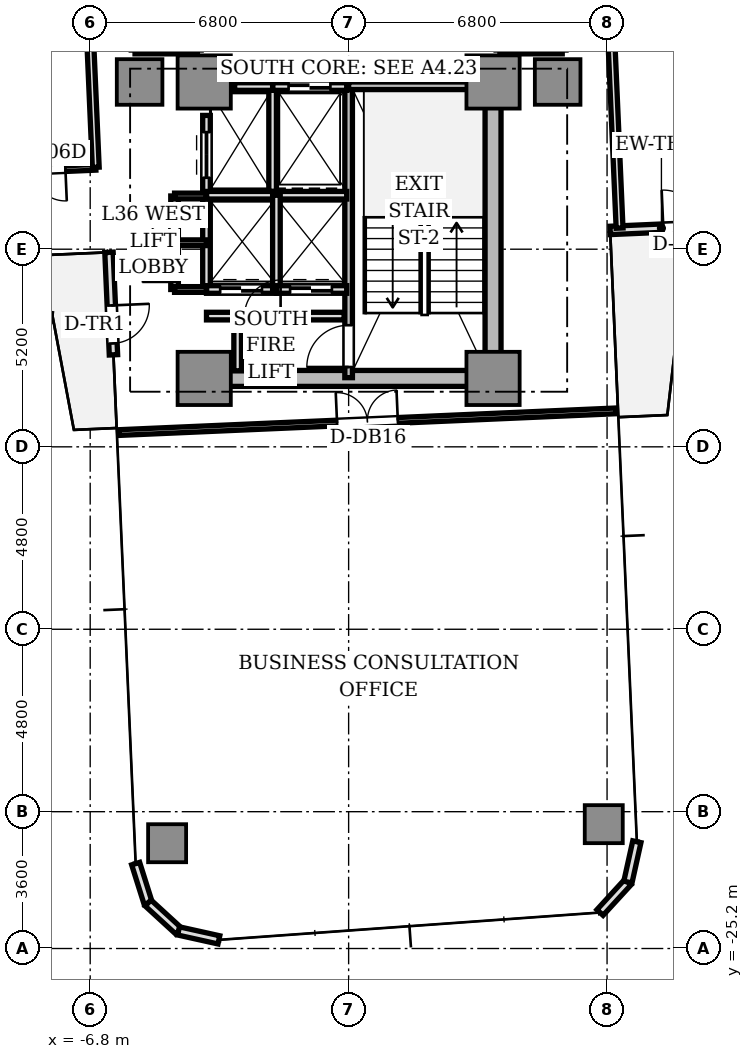
"""IFC4 building model, lengths in metres.
Left out: names, types, materials, properties, quantities, classifications, styles, units other than length and angle.
Written with IfcOpenShell. Run it as: python <this file> out.ifc"""

import sys

from ifc_helpers import new_model, si_unit, direction, frame, frame_2d, origin, origin_2d, place, context, subcontext, project, spatial, rectangle, extrude, source, transform, mapped, element, fill, save


model = new_model("IFC4")
c1 = context("Model", 3, precision=1e-05, world=origin(), true_north=direction((0.0, 1.0)))
c2 = subcontext(c1, "Body", "Model", "MODEL_VIEW")
j1 = project(units=[si_unit("LENGTHUNIT", "METRE"), si_unit("PLANEANGLEUNIT", "RADIAN")], contexts=[c1])
p1 = place(None, origin())
s1 = spatial("IfcSite", under=j1, at=p1, CompositionType="ELEMENT")
p2 = place(p1, origin())
s2 = spatial("IfcBuilding", under=s1, at=p2, CompositionType="ELEMENT")
p3 = place(p2, frame((0.0, 0.0, 131.55)))
s3 = spatial("IfcBuildingStorey", under=s2, at=p3, CompositionType="ELEMENT", Elevation=131.55)
p4 = place(p3, frame((-3.55, -10.2, 0.0), z_axis=(0.0, 0.0, 1.0), x_axis=(1.0, 0.0, 0.0)))
e1 = element("IfcWall", 1, at=p4, inside=s3, PredefinedType="SHEAR", context=c2, shape_type="SweptSolid", body=[
    extrude(rectangle(XDim=7.1, YDim=0.42, at=frame_2d((3.55, 0.0))), origin(), (0.0, 0.0, 1.0), 3.11),
])
p5 = place(p3, frame((3.8, -9.75, 0.0), z_axis=(0.0, 0.0, 1.0), x_axis=(0.0, 1.0, 0.0)))
e2 = element("IfcWall", 2, at=p5, inside=s3, PredefinedType="SHEAR", context=c2, shape_type="SweptSolid", body=[
    extrude(rectangle(XDim=6.9, YDim=0.42, at=frame_2d((3.45, 0.0))), origin(), (0.0, 0.0, 1.0), 3.11),
])
m1 = source(origin(), c2, "Body", "SweptSolid", [
    extrude(rectangle(XDim=1.4, YDim=1.4, at=origin_2d()), origin(), (0.0, 0.0, 1.0), 3.11),
])
for number, where, z_axis, x_axis in (
    (3, (-3.8, -2.4, 0.0), (0.0, 0.0, 1.0), (1.0, 0.0, 0.0)),
    (4, (3.8, -2.4, 0.0), (0.0, 0.0, 1.0), (1.0, 0.0, 0.0)),
    (5, (-3.8, -10.2, 0.0), (0.0, 0.0, 1.0), (1.0, 0.0, 0.0)),
    (6, (3.8, -10.2, 0.0), (0.0, 0.0, 1.0), (1.0, 0.0, 0.0)),
):
    element("IfcColumn", number, at=place(p3, frame(where, z_axis=z_axis, x_axis=x_axis)), inside=s3, PredefinedType="COLUMN", context=c2, shape_type="MappedRepresentation", body=[
        mapped(m1, transform((0.0, 0.0, 0.0), scale=1.0)),
    ])
m2 = source(origin(), c2, "Body", "SweptSolid", [
    extrude(rectangle(XDim=1.2, YDim=1.2, at=origin_2d()), origin(), (0.0, 0.0, 1.0), 3.11),
])
for number, where, z_axis, x_axis in (
    (7, (5.5, -2.4, 0.0), (0.0, 0.0, 1.0), (1.0, 0.0, 0.0)),
    (8, (-5.5, -2.4, 0.0), (0.0, 0.0, 1.0), (1.0, 0.0, 0.0)),
):
    element("IfcColumn", number, at=place(p3, frame(where, z_axis=z_axis, x_axis=x_axis)), inside=s3, PredefinedType="COLUMN", context=c2, shape_type="MappedRepresentation", body=[
        mapped(m2, transform((0.0, 0.0, 0.0), scale=1.0)),
    ])
m3 = source(origin(), c2, "Body", "SweptSolid", [
    extrude(rectangle(XDim=1.0, YDim=1.0, at=origin_2d()), origin(), (0.0, 0.0, 1.0), 3.11),
])
for number, where, z_axis, x_axis in (
    (9, (-4.776, -22.43, 0.0), (0.0, 0.0, 1.0), (1.0, 0.0, 0.0)),
    (10, (6.713, -21.928, 0.0), (0.0, 0.0, 1.0), (1.0, 0.0, 0.0)),
):
    element("IfcColumn", number, at=place(p3, frame(where, z_axis=z_axis, x_axis=x_axis)), inside=s3, PredefinedType="COLUMN", context=c2, shape_type="MappedRepresentation", body=[
        mapped(m3, transform((0.0, 0.0, 0.0), scale=1.0)),
    ])
p6 = place(p3, frame((6.882, -6.306, 0.0), z_axis=(0.0, 0.0, 1.0), x_axis=(0.999045894436, 0.043672655174, 0.0)))
e11 = element("IfcWall", 11, at=p6, inside=s3, PredefinedType="STANDARD", context=c2, shape_type="SweptSolid", body=[
    extrude(rectangle(XDim=2.7, YDim=0.22, at=frame_2d((1.35, 0.0))), origin(), (0.0, 0.0, 1.0), 3.11),
])
p7 = place(p6, frame((1.4, 0.0, 0.0)))
e12 = element("IfcOpeningElement", 12, at=p7, cuts=e11, PredefinedType="OPENING", context=c2, shape_type="SweptSolid", body=[
    extrude(rectangle(XDim=1.0, YDim=2.2, at=frame_2d((0.5, 1.1))), frame((0.0, 0.12, 0.0), z_axis=(0.0, -1.0, 0.0), x_axis=(1.0, 0.0, 0.0)), (0.0, 0.0, 1.0), 0.24),
])
p8 = place(p3, frame((-6.306, -6.882, 0.0), z_axis=(0.0, 0.0, 1.0), x_axis=(0.043672655174, -0.999045894436, 0.0)))
e13 = element("IfcWall", 13, at=p8, inside=s3, PredefinedType="STANDARD", context=c2, shape_type="SweptSolid", body=[
    extrude(rectangle(XDim=2.7, YDim=0.22, at=frame_2d((1.35, 0.0))), origin(), (0.0, 0.0, 1.0), 3.11),
])
p9 = place(p8, frame((1.4, 0.0, 0.0)))
e14 = element("IfcOpeningElement", 14, at=p9, cuts=e13, PredefinedType="OPENING", context=c2, shape_type="SweptSolid", body=[
    extrude(rectangle(XDim=1.0, YDim=2.2, at=frame_2d((0.5, 1.1))), frame((0.0, 0.12, 0.0), z_axis=(0.0, -1.0, 0.0), x_axis=(1.0, 0.0, 0.0)), (0.0, 0.0, 1.0), 0.24),
])
p10 = place(p3, frame((-5.604, -22.966, 0.0), z_axis=(0.0, 0.0, 1.0), x_axis=(0.300755105707, -0.953701403161, 0.0)))
e15 = element("IfcWall", 15, at=p10, inside=s3, PredefinedType="STANDARD", context=c2, shape_type="SweptSolid", body=[
    extrude(rectangle(XDim=1.087, YDim=0.22, at=frame_2d((0.543, 0.0))), origin(), (0.0, 0.0, 1.0), 3.11),
])
p11 = place(p3, frame((-5.277, -24.003, 0.0), z_axis=(0.0, 0.0, 1.0), x_axis=(0.737312600672, -0.675551721847, 0.0)))
e16 = element("IfcWall", 16, at=p11, inside=s3, PredefinedType="STANDARD", context=c2, shape_type="SweptSolid", body=[
    extrude(rectangle(XDim=1.087, YDim=0.22, at=frame_2d((0.543, 0.0))), origin(), (0.0, 0.0, 1.0), 3.11),
])
for number, where, z_axis, x_axis in (
    (17, (-4.475, -24.737, 0.0), (0.0, 0.0, 1.0), (0.976, -0.217, 0.0)),
    (18, (6.614, -24.253, 0.0), (0.0, 0.0, 1.0), (0.676, 0.737, 0.0)),
):
    element("IfcWall", number, at=place(p3, frame(where, z_axis=z_axis, x_axis=x_axis)), inside=s3, PredefinedType="STANDARD", context=c2, shape_type="SweptSolid", body=[
        extrude(rectangle(XDim=1.087, YDim=0.22, at=frame_2d((0.543, 0.0))), origin(), (0.0, 0.0, 1.0), 3.11),
    ])
p12 = place(p3, frame((7.349, -23.452, 0.0), z_axis=(0.0, 0.0, 1.0), x_axis=(0.216454939174, 0.976292609471, 0.0)))
e19 = element("IfcWall", 19, at=p12, inside=s3, PredefinedType="STANDARD", context=c2, shape_type="SweptSolid", body=[
    extrude(rectangle(XDim=1.087, YDim=0.22, at=frame_2d((0.544, 0.0))), origin(), (0.0, 0.0, 1.0), 3.11),
])
p13 = place(p3, frame((0.0, -10.18, 0.0), z_axis=(0.0, 0.0, 1.0), x_axis=(0.0, 1.0, 0.0)))
e20 = element("IfcWall", 20, at=p13, inside=s3, PredefinedType="SOLIDWALL", context=c2, shape_type="SweptSolid", body=[
    extrude(rectangle(XDim=7.68, YDim=0.2, at=frame_2d((3.84, 0.0))), origin(), (0.0, 0.0, 1.0), 3.11),
])
p14 = place(p13, frame((0.28, 0.0, 0.0)))
e21 = element("IfcOpeningElement", 21, at=p14, cuts=e20, PredefinedType="OPENING", context=c2, shape_type="SweptSolid", body=[
    extrude(rectangle(XDim=1.1, YDim=2.15, at=frame_2d((0.55, 1.075))), frame((0.0, 0.11, 0.0), z_axis=(0.0, -1.0, 0.0), x_axis=(1.0, 0.0, 0.0)), (0.0, 0.0, 1.0), 0.22),
])
p15 = place(p3, frame((0.0, -2.5, 0.0), z_axis=(0.0, 0.0, 1.0), x_axis=(1.0, 0.0, 0.0)))
e22 = element("IfcWall", 22, at=p15, inside=s3, PredefinedType="SOLIDWALL", context=c2, shape_type="SweptSolid", body=[
    extrude(rectangle(XDim=3.72, YDim=0.2, at=frame_2d((1.86, 0.0))), origin(), (0.0, 0.0, 1.0), 3.11),
])
p16 = place(p3, frame((-2.0, -5.28, 0.0), z_axis=(0.0, 0.0, 1.0), x_axis=(0.0, 1.0, 0.0)))
e23 = element("IfcWall", 23, at=p16, inside=s3, PredefinedType="SOLIDWALL", context=c2, shape_type="SweptSolid", body=[
    extrude(rectangle(XDim=2.78, YDim=0.2, at=frame_2d((1.39, 0.0))), origin(), (0.0, 0.0, 1.0), 2.66),
])
p17 = place(p3, frame((-2.0, -2.52, 0.0), z_axis=(0.0, 0.0, 1.0), x_axis=(1.0, 0.0, 0.0)))
e24 = element("IfcWall", 24, at=p17, inside=s3, PredefinedType="SOLIDWALL", context=c2, shape_type="SweptSolid", body=[
    extrude(rectangle(XDim=1.95, YDim=0.2, at=frame_2d((0.975, 0.0))), origin(), (0.0, 0.0, 1.0), 2.66),
])
p18 = place(p17, frame((0.42, 0.0, 0.0)))
e25 = element("IfcOpeningElement", 25, at=p18, cuts=e24, PredefinedType="OPENING", context=c2, shape_type="SweptSolid", body=[
    extrude(rectangle(XDim=1.1, YDim=2.2, at=frame_2d((0.55, 1.1))), frame((0.0, 0.11, 0.0), z_axis=(0.0, -1.0, 0.0), x_axis=(1.0, 0.0, 0.0)), (0.0, 0.0, 1.0), 0.22),
])
p19 = place(p3, frame((-3.0, -2.52, 0.0), z_axis=(0.0, 0.0, 1.0), x_axis=(1.0, 0.0, 0.0)))
e26 = element("IfcWall", 26, at=p19, inside=s3, PredefinedType="SOLIDWALL", context=c2, shape_type="SweptSolid", body=[
    extrude(rectangle(XDim=1.0, YDim=0.2, at=frame_2d((0.5, 0.0))), origin(), (0.0, 0.0, 1.0), 2.66),
])
p20 = place(p3, frame((-3.74, -5.36, 0.0), z_axis=(0.0, 0.0, 1.0), x_axis=(0.0, 1.0, 0.0)))
e27 = element("IfcWall", 27, at=p20, inside=s3, PredefinedType="SOLIDWALL", context=c2, shape_type="SweptSolid", body=[
    extrude(rectangle(XDim=2.08, YDim=0.2, at=frame_2d((1.04, 0.0))), origin(), (0.0, 0.0, 1.0), 2.66),
])
p21 = place(p20, frame((0.44, 0.0, 0.0)))
e28 = element("IfcOpeningElement", 28, at=p21, cuts=e27, PredefinedType="OPENING", context=c2, shape_type="SweptSolid", body=[
    extrude(rectangle(XDim=1.2, YDim=2.2, at=frame_2d((0.6, 1.1))), frame((0.0, 0.11, 0.0), z_axis=(0.0, -1.0, 0.0), x_axis=(1.0, 0.0, 0.0)), (0.0, 0.0, 1.0), 0.22),
])
p22 = place(p3, frame((-3.74, -7.86, 0.0), z_axis=(0.0, 0.0, 1.0), x_axis=(0.0, 1.0, 0.0)))
e29 = element("IfcWall", 29, at=p22, inside=s3, PredefinedType="SOLIDWALL", context=c2, shape_type="SweptSolid", body=[
    extrude(rectangle(XDim=2.48, YDim=0.2, at=frame_2d((1.24, 0.0))), origin(), (0.0, 0.0, 1.0), 2.66),
])
p23 = place(p3, frame((-3.74, -7.86, 0.0), z_axis=(0.0, 0.0, 1.0), x_axis=(1.0, 0.0, 0.0)))
e30 = element("IfcWall", 30, at=p23, inside=s3, PredefinedType="SOLIDWALL", context=c2, shape_type="SweptSolid", body=[
    extrude(rectangle(XDim=1.84, YDim=0.2, at=frame_2d((0.92, 0.0))), origin(), (0.0, 0.0, 1.0), 2.66),
])
p24 = place(p23, frame((0.36, 0.0, 0.0)))
e31 = element("IfcOpeningElement", 31, at=p24, cuts=e30, PredefinedType="OPENING", context=c2, shape_type="SweptSolid", body=[
    extrude(rectangle(XDim=1.1, YDim=2.2, at=frame_2d((0.55, 1.1))), frame((0.0, 0.11, 0.0), z_axis=(0.0, -1.0, 0.0), x_axis=(1.0, 0.0, 0.0)), (0.0, 0.0, 1.0), 0.22),
])
p25 = place(p3, frame((-3.74, -5.38, 0.0), z_axis=(0.0, 0.0, 1.0), x_axis=(1.0, 0.0, 0.0)))
e32 = element("IfcWall", 32, at=p25, inside=s3, PredefinedType="SOLIDWALL", context=c2, shape_type="SweptSolid", body=[
    extrude(rectangle(XDim=3.69, YDim=0.2, at=frame_2d((1.845, 0.0))), origin(), (0.0, 0.0, 1.0), 2.66),
])
p26 = place(p3, frame((-1.9, -7.86, 0.0), z_axis=(0.0, 0.0, 1.0), x_axis=(0.0, 1.0, 0.0)))
e33 = element("IfcWall", 33, at=p26, inside=s3, PredefinedType="SOLIDWALL", context=c2, shape_type="SweptSolid", body=[
    extrude(rectangle(XDim=2.48, YDim=0.2, at=frame_2d((1.24, 0.0))), origin(), (0.0, 0.0, 1.0), 2.66),
])
p27 = place(p3, frame((-1.9, -7.86, 0.0), z_axis=(0.0, 0.0, 1.0), x_axis=(1.0, 0.0, 0.0)))
e34 = element("IfcWall", 34, at=p27, inside=s3, PredefinedType="SOLIDWALL", context=c2, shape_type="SweptSolid", body=[
    extrude(rectangle(XDim=1.85, YDim=0.2, at=frame_2d((0.925, 0.0))), origin(), (0.0, 0.0, 1.0), 2.66),
])
p28 = place(p27, frame((0.36, 0.0, 0.0)))
e35 = element("IfcOpeningElement", 35, at=p28, cuts=e34, PredefinedType="OPENING", context=c2, shape_type="SweptSolid", body=[
    extrude(rectangle(XDim=1.1, YDim=2.2, at=frame_2d((0.55, 1.1))), frame((0.0, 0.11, 0.0), z_axis=(0.0, -1.0, 0.0), x_axis=(1.0, 0.0, 0.0)), (0.0, 0.0, 1.0), 0.22),
])
for number, where, z_axis, x_axis in (
    (36, (3.98, -1.56, 0.0), (0.0, 0.0, 1.0), (1.0, 0.0, 0.0)),
    (37, (-5.62, -1.56, 0.0), (0.0, 0.0, 1.0), (1.0, 0.0, 0.0)),
):
    element("IfcWall", number, at=place(p3, frame(where, z_axis=z_axis, x_axis=x_axis)), inside=s3, PredefinedType="SOLIDWALL", context=c2, shape_type="SweptSolid", body=[
        extrude(rectangle(XDim=1.64, YDim=0.2, at=frame_2d((0.82, 0.0))), origin(), (0.0, 0.0, 1.0), 2.66),
    ])
p29 = place(p3, frame((-3.74, -8.56, 0.0), z_axis=(0.0, 0.0, 1.0), x_axis=(1.0, 0.0, 0.0)))
e38 = element("IfcWall", 38, at=p29, inside=s3, PredefinedType="SOLIDWALL", context=c2, shape_type="SweptSolid", body=[
    extrude(rectangle(XDim=3.62, YDim=0.2, at=frame_2d((1.81, 0.0))), origin(), (0.0, 0.0, 1.0), 2.66),
])
p30 = place(p29, frame((1.0, 0.0, 0.0)))
e39 = element("IfcOpeningElement", 39, at=p30, cuts=e38, PredefinedType="OPENING", context=c2, shape_type="SweptSolid", body=[
    extrude(rectangle(XDim=0.95, YDim=2.15, at=frame_2d((0.475, 1.075))), frame((0.0, 0.11, 0.0), z_axis=(0.0, -1.0, 0.0), x_axis=(1.0, 0.0, 0.0)), (0.0, 0.0, 1.0), 0.22),
])
p31 = place(p3, frame((-2.92, -10.0, 0.0), z_axis=(0.0, 0.0, 1.0), x_axis=(0.0, 1.0, 0.0)))
e40 = element("IfcWall", 40, at=p31, inside=s3, PredefinedType="SOLIDWALL", context=c2, shape_type="SweptSolid", body=[
    extrude(rectangle(XDim=1.44, YDim=0.2, at=frame_2d((0.72, 0.0))), origin(), (0.0, 0.0, 1.0), 2.66),
])
p32 = place(p3, frame((-4.58, -7.86, 0.0), z_axis=(0.0, 0.0, 1.0), x_axis=(0.0, 1.0, 0.0)))
e41 = element("IfcWall", 41, at=p32, inside=s3, PredefinedType="SOLIDWALL", context=c2, shape_type="SweptSolid", body=[
    extrude(rectangle(XDim=2.46, YDim=0.2, at=frame_2d((1.23, 0.0))), origin(), (0.0, 0.0, 1.0), 2.66),
])
p33 = place(p32, frame((0.2, 0.0, 0.0)))
e42 = element("IfcOpeningElement", 42, at=p33, cuts=e41, PredefinedType="OPENING", context=c2, shape_type="SweptSolid", body=[
    extrude(rectangle(XDim=0.85, YDim=2.1, at=frame_2d((0.425, 1.05))), frame((0.0, 0.11, 0.0), z_axis=(0.0, -1.0, 0.0), x_axis=(1.0, 0.0, 0.0)), (0.0, 0.0, 1.0), 0.22),
])
p34 = place(p32, frame((1.38, 0.0, 0.0)))
e43 = element("IfcOpeningElement", 43, at=p34, cuts=e41, PredefinedType="OPENING", context=c2, shape_type="SweptSolid", body=[
    extrude(rectangle(XDim=0.85, YDim=2.1, at=frame_2d((0.425, 1.05))), frame((0.0, 0.11, 0.0), z_axis=(0.0, -1.0, 0.0), x_axis=(1.0, 0.0, 0.0)), (0.0, 0.0, 1.0), 0.22),
])
for number, where, z_axis, x_axis in (
    (44, (-4.58, -5.4, 0.0), (0.0, 0.0, 1.0), (1.0, 0.0, 0.0)),
    (45, (-4.58, -7.86, 0.0), (0.0, 0.0, 1.0), (1.0, 0.0, 0.0)),
    (46, (-4.58, -6.63, 0.0), (0.0, 0.0, 1.0), (1.0, 0.0, 0.0)),
):
    element("IfcWall", number, at=place(p3, frame(where, z_axis=z_axis, x_axis=x_axis)), inside=s3, PredefinedType="PARTITIONING", context=c2, shape_type="SweptSolid", body=[
        extrude(rectangle(XDim=0.84, YDim=0.15, at=frame_2d((0.42, 0.0))), origin(), (0.0, 0.0, 1.0), 2.66),
    ])
p35 = place(p3, frame((7.129, -6.245, 0.0), z_axis=(0.0, 0.0, 1.0), x_axis=(-0.043600217373, 0.999049058378, 0.0)))
e47 = element("IfcWall", 47, at=p35, inside=s3, PredefinedType="PARTITIONING", context=c2, shape_type="SweptSolid", body=[
    extrude(rectangle(XDim=7.8, YDim=0.18, at=frame_2d((3.9, 0.0))), origin(), (0.0, 0.0, 1.0), 2.66),
])
p36 = place(p3, frame((-6.654, -4.645, 0.0), z_axis=(0.0, 0.0, 1.0), x_axis=(-0.999048925025, -0.043603272887, 0.0)))
e48 = element("IfcWall", 48, at=p36, inside=s3, PredefinedType="PARTITIONING", context=c2, shape_type="SweptSolid", body=[
    extrude(rectangle(XDim=8.55, YDim=0.15, at=frame_2d((4.275, 0.0))), origin(), (0.0, 0.0, 1.0), 2.63),
])
p37 = place(p36, frame((0.8, 0.0, 0.0)))
e49 = element("IfcOpeningElement", 49, at=p37, cuts=e48, PredefinedType="OPENING", context=c2, shape_type="SweptSolid", body=[
    extrude(rectangle(XDim=0.85, YDim=2.1, at=frame_2d((0.425, 1.05))), frame((0.0, 0.085, 0.0), z_axis=(0.0, -1.0, 0.0), x_axis=(1.0, 0.0, 0.0)), (0.0, 0.0, 1.0), 0.17),
])
p38 = place(p36, frame((4.1, 0.0, 0.0)))
e50 = element("IfcOpeningElement", 50, at=p38, cuts=e48, PredefinedType="OPENING", context=c2, shape_type="SweptSolid", body=[
    extrude(rectangle(XDim=0.85, YDim=2.1, at=frame_2d((0.425, 1.05))), frame((0.0, 0.085, 0.0), z_axis=(0.0, -1.0, 0.0), x_axis=(1.0, 0.0, 0.0)), (0.0, 0.0, 1.0), 0.17),
])
p39 = place(p3, frame((-7.129, 6.245, 0.0), z_axis=(0.0, 0.0, 1.0), x_axis=(0.043608291235, -0.999048705988, 0.0)))
e51 = element("IfcWall", 51, at=p39, inside=s3, PredefinedType="PARTITIONING", context=c2, shape_type="SweptSolid", body=[
    extrude(rectangle(XDim=10.9, YDim=0.18, at=frame_2d((5.45, 0.0))), origin(), (0.0, 0.0, 1.0), 2.66),
])
p40 = place(p3, frame((-6.049, -11.625, 0.0), z_axis=(0.0, 0.0, 1.0), x_axis=(0.999047806124, 0.043628901879, 0.0)))
e52 = element("IfcWall", 52, at=p40, inside=s3, PredefinedType="PARTITIONING", context=c2, shape_type="SweptSolid", body=[
    extrude(rectangle(XDim=13.1, YDim=0.15, at=frame_2d((6.55, 0.0))), origin(), (0.0, 0.0, 1.0), 2.66),
])
p41 = place(p40, frame((5.75, 0.0, 0.0)))
e53 = element("IfcOpeningElement", 53, at=p41, cuts=e52, PredefinedType="OPENING", context=c2, shape_type="SweptSolid", body=[
    extrude(rectangle(XDim=1.6, YDim=2.25, at=frame_2d((0.8, 1.125))), frame((0.0, 0.085, 0.0), z_axis=(0.0, -1.0, 0.0), x_axis=(1.0, 0.0, 0.0)), (0.0, 0.0, 1.0), 0.17),
])
m4 = source(origin(), c2, "Body", "SweptSolid", [
    extrude(rectangle(XDim=1.0, YDim=0.05, at=origin_2d()), origin(), (0.0, 0.0, 1.0), 2.2),
])
p42 = place(p7, frame((0.5, 0.0, 0.0)))
e54 = element("IfcDoor", 54, at=p42, inside=s3, OperationType="SINGLE_SWING_LEFT", PredefinedType="DOOR", context=c2, shape_type="MappedRepresentation", body=[
    mapped(m4, transform((0.0, 0.0, 0.0), scale=1.0)),
])
fill(e12, e54)
p43 = place(p9, frame((0.5, 0.0, 0.0)))
e55 = element("IfcDoor", 55, at=p43, inside=s3, OperationType="SINGLE_SWING_LEFT", PredefinedType="DOOR", context=c2, shape_type="MappedRepresentation", body=[
    mapped(m4, transform((0.0, 0.0, 0.0), scale=1.0)),
])
fill(e14, e55)
m5 = source(origin(), c2, "Body", "SweptSolid", [
    extrude(rectangle(XDim=1.1, YDim=0.05, at=origin_2d()), origin(), (0.0, 0.0, 1.0), 2.2),
])
p44 = place(p18, frame((0.55, 0.0, 0.0)))
e56 = element("IfcDoor", 56, at=p44, inside=s3, OperationType="DOUBLE_DOOR_SLIDING", PredefinedType="DOOR", context=c2, shape_type="MappedRepresentation", body=[
    mapped(m5, transform((0.0, 0.0, 0.0), scale=1.0)),
])
fill(e25, e56)
m6 = source(origin(), c2, "Body", "SweptSolid", [
    extrude(rectangle(XDim=1.2, YDim=0.05, at=origin_2d()), origin(), (0.0, 0.0, 1.0), 2.2),
])
p45 = place(p21, frame((0.6, 0.0, 0.0)))
e57 = element("IfcDoor", 57, at=p45, inside=s3, OperationType="DOUBLE_DOOR_SLIDING", PredefinedType="DOOR", context=c2, shape_type="MappedRepresentation", body=[
    mapped(m6, transform((0.0, 0.0, 0.0), scale=1.0)),
])
fill(e28, e57)
p46 = place(p24, frame((0.55, 0.0, 0.0)))
e58 = element("IfcDoor", 58, at=p46, inside=s3, OperationType="DOUBLE_DOOR_SLIDING", PredefinedType="DOOR", context=c2, shape_type="MappedRepresentation", body=[
    mapped(m5, transform((0.0, 0.0, 0.0), scale=1.0)),
])
fill(e31, e58)
p47 = place(p28, frame((0.55, 0.0, 0.0)))
e59 = element("IfcDoor", 59, at=p47, inside=s3, OperationType="DOUBLE_DOOR_SLIDING", PredefinedType="DOOR", context=c2, shape_type="MappedRepresentation", body=[
    mapped(m5, transform((0.0, 0.0, 0.0), scale=1.0)),
])
fill(e35, e59)
m7 = source(origin(), c2, "Body", "SweptSolid", [
    extrude(rectangle(XDim=1.1, YDim=0.05, at=origin_2d()), origin(), (0.0, 0.0, 1.0), 2.15),
])
p48 = place(p14, frame((0.55, 0.0, 0.0)))
e60 = element("IfcDoor", 60, at=p48, inside=s3, OperationType="SINGLE_SWING_LEFT", PredefinedType="DOOR", context=c2, shape_type="MappedRepresentation", body=[
    mapped(m7, transform((0.0, 0.0, 0.0), scale=1.0)),
])
fill(e21, e60)
m8 = source(origin(), c2, "Body", "SweptSolid", [
    extrude(rectangle(XDim=0.95, YDim=0.05, at=origin_2d()), origin(), (0.0, 0.0, 1.0), 2.15),
])
p49 = place(p30, frame((0.475, 0.0, 0.0)))
e61 = element("IfcDoor", 61, at=p49, inside=s3, OperationType="SINGLE_SWING_RIGHT", PredefinedType="DOOR", context=c2, shape_type="MappedRepresentation", body=[
    mapped(m8, transform((0.0, 0.0, 0.0), scale=1.0)),
])
fill(e39, e61)
m9 = source(origin(), c2, "Body", "SweptSolid", [
    extrude(rectangle(XDim=0.85, YDim=0.05, at=origin_2d()), origin(), (0.0, 0.0, 1.0), 2.1),
])
p50 = place(p33, frame((0.425, 0.0, 0.0)))
e62 = element("IfcDoor", 62, at=p50, inside=s3, OperationType="SINGLE_SWING_LEFT", PredefinedType="DOOR", context=c2, shape_type="MappedRepresentation", body=[
    mapped(m9, transform((0.0, 0.0, 0.0), scale=1.0)),
])
fill(e42, e62)
p51 = place(p34, frame((0.425, 0.0, 0.0)))
e63 = element("IfcDoor", 63, at=p51, inside=s3, OperationType="SINGLE_SWING_RIGHT", PredefinedType="DOOR", context=c2, shape_type="MappedRepresentation", body=[
    mapped(m9, transform((0.0, 0.0, 0.0), scale=1.0)),
])
fill(e43, e63)
p52 = place(p37, frame((0.425, 0.0, 0.0)))
e64 = element("IfcDoor", 64, at=p52, inside=s3, OperationType="SINGLE_SWING_LEFT", PredefinedType="DOOR", context=c2, shape_type="MappedRepresentation", body=[
    mapped(m9, transform((0.0, 0.0, 0.0), scale=1.0)),
])
fill(e49, e64)
m10 = source(origin(), c2, "Body", "SweptSolid", [
    extrude(rectangle(XDim=1.6, YDim=0.05, at=origin_2d()), origin(), (0.0, 0.0, 1.0), 2.25),
])
p53 = place(p41, frame((0.8, 0.0, 0.0)))
e65 = element("IfcDoor", 65, at=p53, inside=s3, OperationType="DOUBLE_DOOR_SINGLE_SWING", PredefinedType="DOOR", context=c2, shape_type="MappedRepresentation", body=[
    mapped(m10, transform((0.0, 0.0, 0.0), scale=1.0)),
])
fill(e53, e65)
save(model, sys.argv[1])
